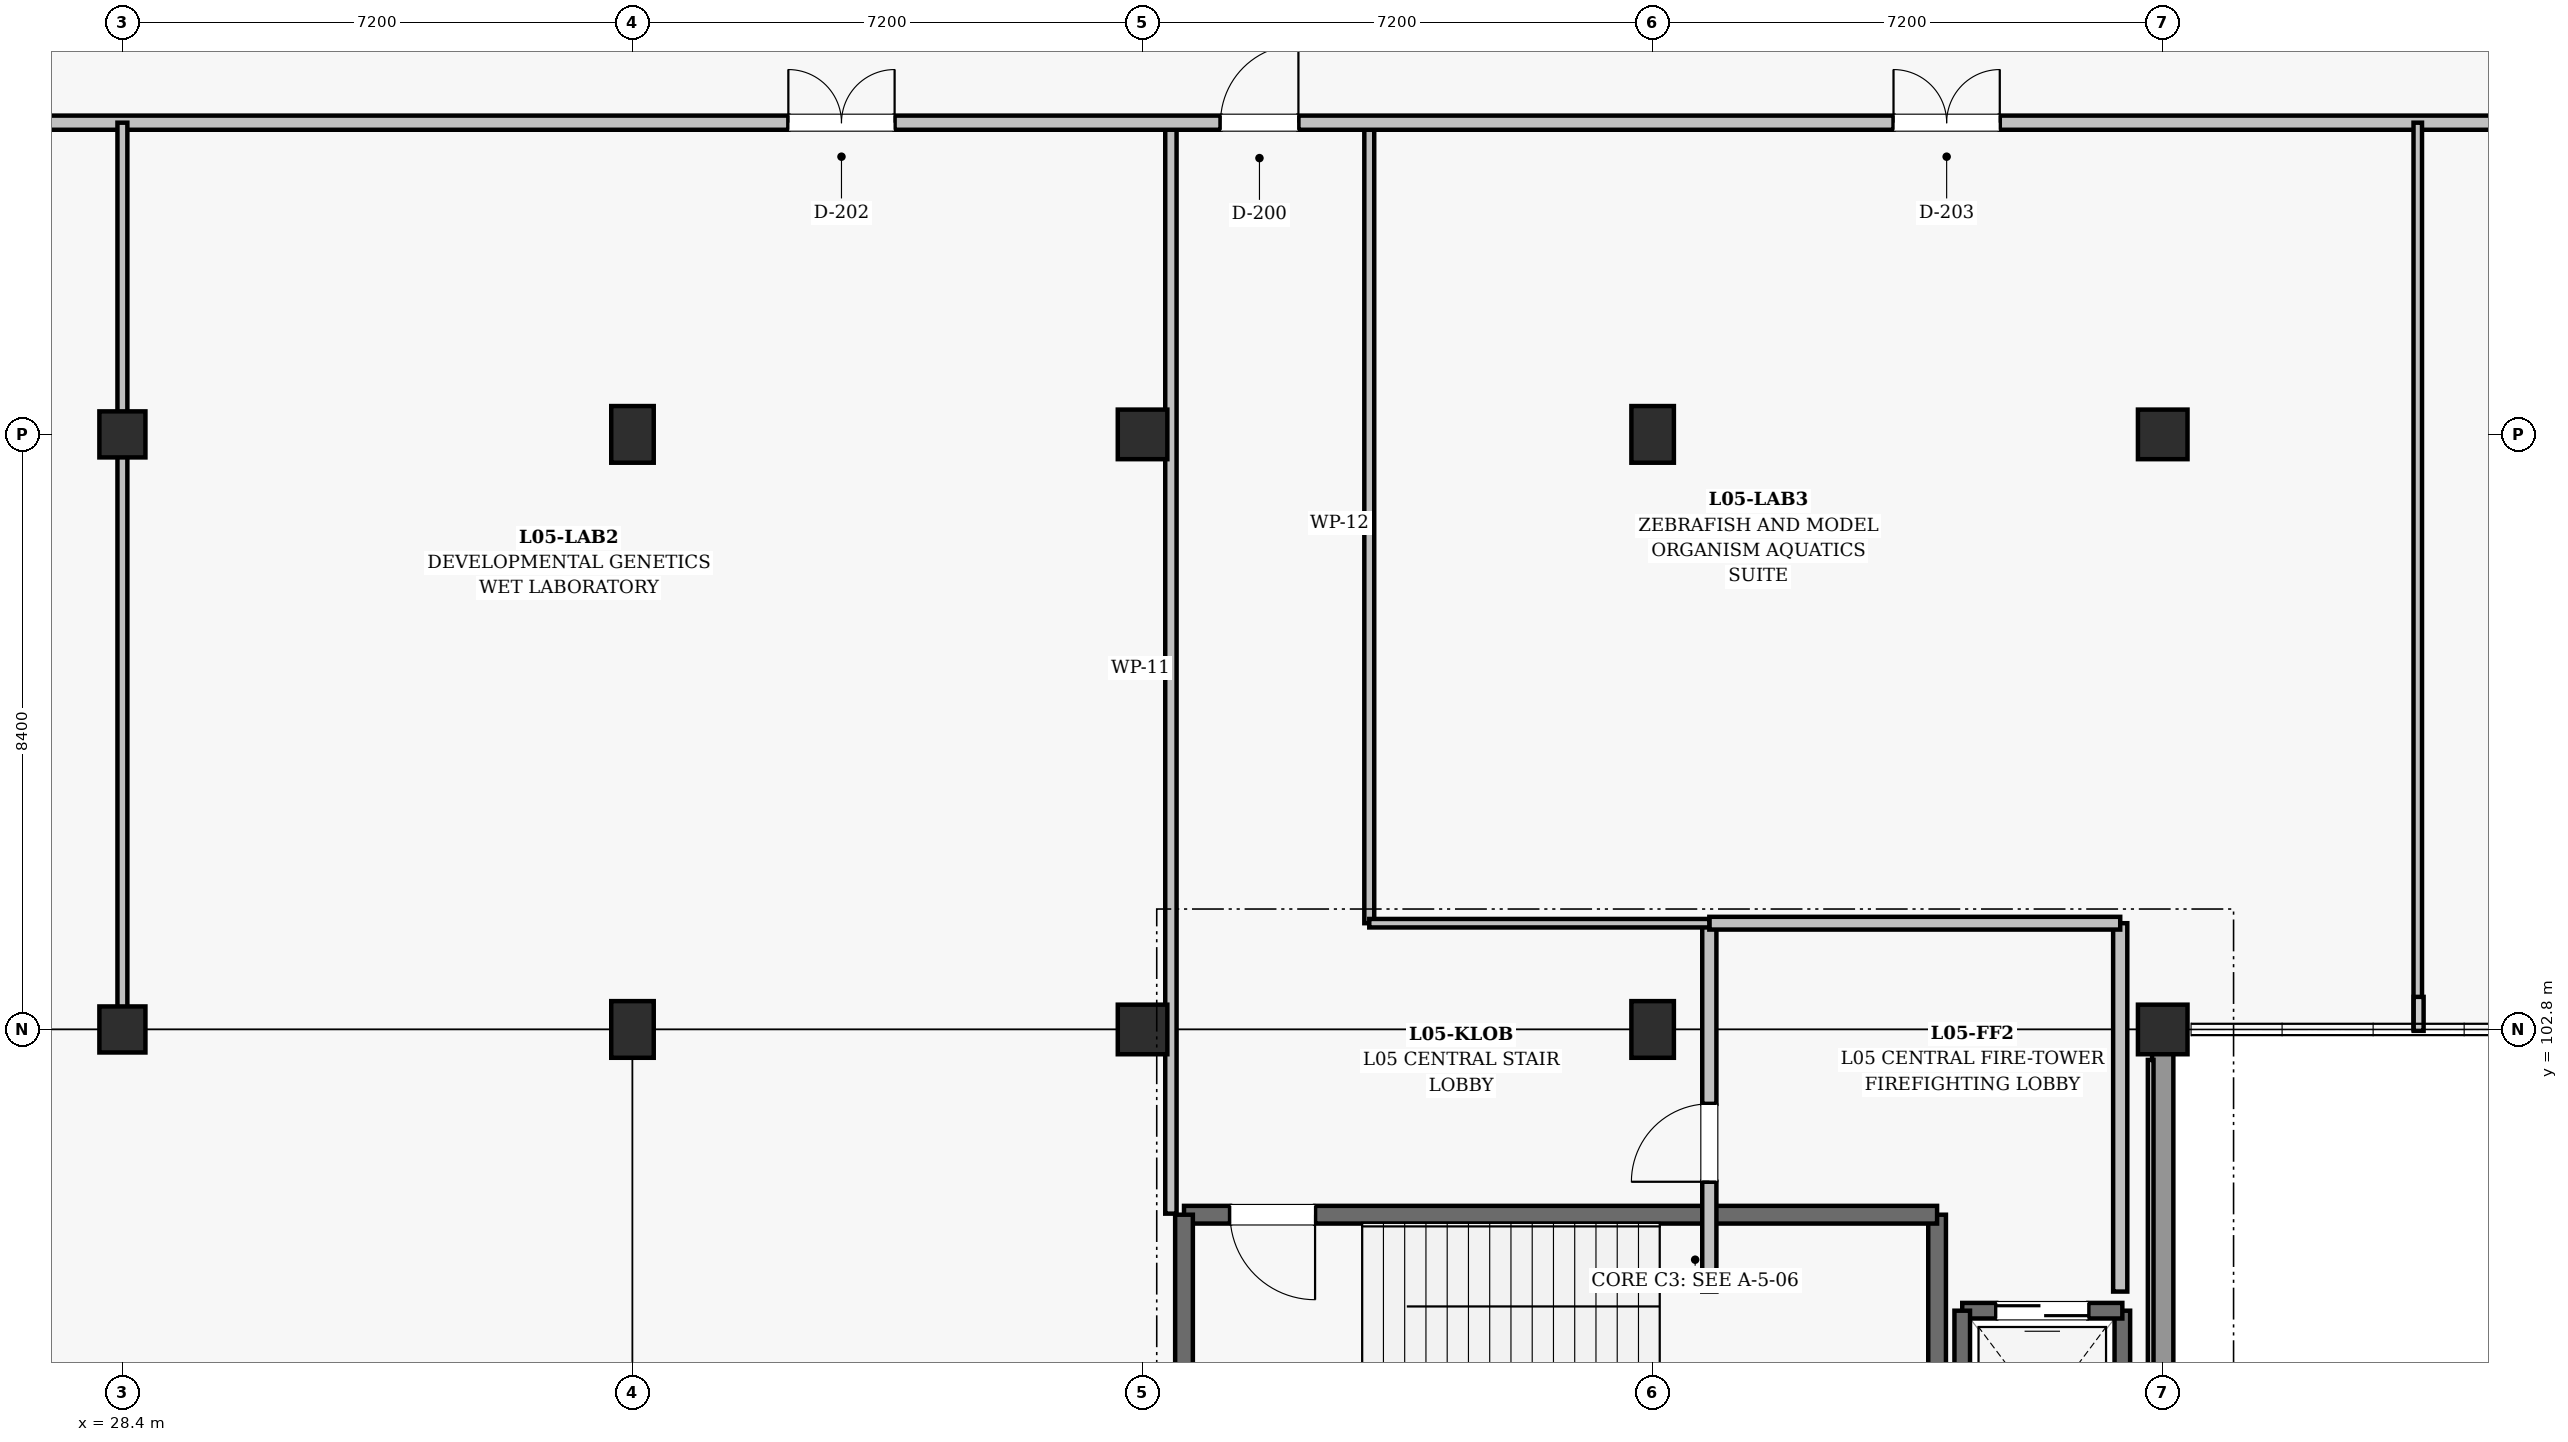
"""IFC4 building model, lengths in metres.
Left out: names, types, materials, properties, quantities, classifications, styles, units other than length and angle.
Written with IfcOpenShell. Run it as: python <this file> out.ifc"""

import sys

from ifc_helpers import new_model, si_unit, direction, frame, frame_2d, origin, origin_2d, place, context, subcontext, project, spatial, rectangle, extrude, element, fill, save


model = new_model("IFC4")
c1 = context("Model", 3, precision=1e-05, world=origin(), true_north=direction((0.0, 1.0)))
c2 = subcontext(c1, "Body", "Model", "MODEL_VIEW")
j1 = project(units=[si_unit("LENGTHUNIT", "METRE"), si_unit("PLANEANGLEUNIT", "RADIAN")], contexts=[c1])
p1 = place(None, origin())
s1 = spatial("IfcSite", under=j1, at=p1, CompositionType="ELEMENT")
p2 = place(p1, origin())
s2 = spatial("IfcBuilding", under=s1, at=p2, CompositionType="ELEMENT")
p3 = place(p2, frame((0.0, 0.0, 23.4)))
s3 = spatial("IfcBuildingStorey", under=s2, at=p3, CompositionType="ELEMENT", Elevation=23.4)
for number, where, z_axis, x_axis in (
    (1, (28.4, 102.8, 0.0), (0.0, 0.0, 1.0), (1.0, 0.0, 0.0)),
    (2, (28.4, 111.2, 0.0), (0.0, 0.0, 1.0), (1.0, 0.0, 0.0)),
):
    element("IfcColumn", number, at=place(p3, frame(where, z_axis=z_axis, x_axis=x_axis)), inside=s3, PredefinedType="COLUMN", context=c2, shape_type="SweptSolid", body=[
        extrude(rectangle(XDim=0.65, YDim=0.65, at=origin_2d()), origin(), (0.0, 0.0, 1.0), 4.5),
    ])
for number, where, z_axis, x_axis in (
    (3, (35.6, 102.8, 0.0), (0.0, 0.0, 1.0), (1.0, 0.0, 0.0)),
    (4, (35.6, 111.2, 0.0), (0.0, 0.0, 1.0), (1.0, 0.0, 0.0)),
):
    element("IfcColumn", number, at=place(p3, frame(where, z_axis=z_axis, x_axis=x_axis)), inside=s3, PredefinedType="COLUMN", context=c2, shape_type="SweptSolid", body=[
        extrude(rectangle(XDim=0.6, YDim=0.8, at=origin_2d()), origin(), (0.0, 0.0, 1.0), 4.5),
    ])
for number, where, z_axis, x_axis in (
    (5, (42.8, 102.8, 0.0), (0.0, 0.0, 1.0), (1.0, 0.0, 0.0)),
    (6, (42.8, 111.2, 0.0), (0.0, 0.0, 1.0), (1.0, 0.0, 0.0)),
):
    element("IfcColumn", number, at=place(p3, frame(where, z_axis=z_axis, x_axis=x_axis)), inside=s3, PredefinedType="COLUMN", context=c2, shape_type="SweptSolid", body=[
        extrude(rectangle(XDim=0.7, YDim=0.7, at=origin_2d()), origin(), (0.0, 0.0, 1.0), 4.5),
    ])
for number, where, z_axis, x_axis in (
    (7, (50.0, 102.8, 0.0), (0.0, 0.0, 1.0), (1.0, 0.0, 0.0)),
    (8, (50.0, 111.2, 0.0), (0.0, 0.0, 1.0), (1.0, 0.0, 0.0)),
):
    element("IfcColumn", number, at=place(p3, frame(where, z_axis=z_axis, x_axis=x_axis)), inside=s3, PredefinedType="COLUMN", context=c2, shape_type="SweptSolid", body=[
        extrude(rectangle(XDim=0.6, YDim=0.8, at=origin_2d()), origin(), (0.0, 0.0, 1.0), 4.5),
    ])
for number, where, z_axis, x_axis in (
    (9, (57.2, 102.8, 0.0), (0.0, 0.0, 1.0), (1.0, 0.0, 0.0)),
    (10, (57.2, 111.2, 0.0), (0.0, 0.0, 1.0), (1.0, 0.0, 0.0)),
):
    element("IfcColumn", number, at=place(p3, frame(where, z_axis=z_axis, x_axis=x_axis)), inside=s3, PredefinedType="COLUMN", context=c2, shape_type="SweptSolid", body=[
        extrude(rectangle(XDim=0.7, YDim=0.7, at=origin_2d()), origin(), (0.0, 0.0, 1.0), 4.5),
    ])
p4 = place(p3, frame((57.2, 94.705, 0.0), z_axis=(0.0, 0.0, 1.0), x_axis=(0.0, 1.0, 0.0)))
e11 = element("IfcWall", 11, at=p4, inside=s3, PredefinedType="SOLIDWALL", context=c2, shape_type="SweptSolid", body=[
    extrude(rectangle(XDim=7.765, YDim=0.3, at=frame_2d((3.882, 0.0))), origin(), (0.0, 0.0, 1.0), 3.355),
])
p5 = place(p3, frame((54.015, 95.085, 0.0), z_axis=(0.0, 0.0, 1.0), x_axis=(0.0, 1.0, 0.0)))
e12 = element("IfcWall", 12, at=p5, inside=s3, PredefinedType="SHEAR", context=c2, shape_type="SweptSolid", body=[
    extrude(rectangle(XDim=5.1, YDim=0.25, at=frame_2d((2.55, 0.0))), origin(), (0.0, 0.0, 1.0), 4.175),
])
p6 = place(p3, frame((54.015, 100.185, 0.0), z_axis=(0.0, 0.0, 1.0), x_axis=(-1.0, 0.0, 0.0)))
e13 = element("IfcWall", 13, at=p6, inside=s3, PredefinedType="SHEAR", context=c2, shape_type="SweptSolid", body=[
    extrude(rectangle(XDim=10.63, YDim=0.25, at=frame_2d((5.315, 0.0))), origin(), (0.0, 0.0, 1.0), 4.175),
])
p7 = place(p6, frame((8.78, 0.0, 0.0)))
e14 = element("IfcOpeningElement", 14, at=p7, cuts=e13, PredefinedType="OPENING", context=c2, shape_type="SweptSolid", body=[
    extrude(rectangle(XDim=1.2, YDim=2.15, at=frame_2d((0.6, 1.075))), frame((0.0, 0.135, 0.0), z_axis=(0.0, -1.0, 0.0), x_axis=(1.0, 0.0, 0.0)), (0.0, 0.0, 1.0), 0.27),
])
p8 = place(p3, frame((43.385, 100.185, 0.0), z_axis=(0.0, 0.0, 1.0), x_axis=(0.0, -1.0, 0.0)))
e15 = element("IfcWall", 15, at=p8, inside=s3, PredefinedType="SHEAR", context=c2, shape_type="SweptSolid", body=[
    extrude(rectangle(XDim=5.1, YDim=0.25, at=frame_2d((2.55, 0.0))), origin(), (0.0, 0.0, 1.0), 4.175),
])
p9 = place(p3, frame((56.63, 95.97, 0.0), z_axis=(0.0, 0.0, 1.0), x_axis=(0.0, 1.0, 0.0)))
e16 = element("IfcWall", 16, at=p9, inside=s3, PredefinedType="SHEAR", context=c2, shape_type="SweptSolid", body=[
    extrude(rectangle(XDim=2.86, YDim=0.22, at=frame_2d((1.43, 0.0))), origin(), (0.0, 0.0, 1.0), 4.175),
])
p10 = place(p3, frame((56.63, 98.83, 0.0), z_axis=(0.0, 0.0, 1.0), x_axis=(-1.0, 0.0, 0.0)))
e17 = element("IfcWall", 17, at=p10, inside=s3, PredefinedType="SHEAR", context=c2, shape_type="SweptSolid", body=[
    extrude(rectangle(XDim=2.26, YDim=0.22, at=frame_2d((1.13, 0.0))), origin(), (0.0, 0.0, 1.0), 4.175),
])
p11 = place(p10, frame((0.48, 0.0, 0.0)))
e18 = element("IfcOpeningElement", 18, at=p11, cuts=e17, PredefinedType="OPENING", context=c2, shape_type="SweptSolid", body=[
    extrude(rectangle(XDim=1.3, YDim=2.2, at=frame_2d((0.65, 1.1))), frame((0.0, 0.12, 0.0), z_axis=(0.0, -1.0, 0.0), x_axis=(1.0, 0.0, 0.0)), (0.0, 0.0, 1.0), 0.24),
])
p12 = place(p3, frame((54.37, 98.83, 0.0), z_axis=(0.0, 0.0, 1.0), x_axis=(0.0, -1.0, 0.0)))
e19 = element("IfcWall", 19, at=p12, inside=s3, PredefinedType="SHEAR", context=c2, shape_type="SweptSolid", body=[
    extrude(rectangle(XDim=2.86, YDim=0.22, at=frame_2d((1.43, 0.0))), origin(), (0.0, 0.0, 1.0), 4.175),
])
p13 = place(p3, frame((50.8, 99.1, 0.0), z_axis=(0.0, 0.0, 1.0), x_axis=(0.0, 1.0, 0.0)))
e20 = element("IfcWall", 20, at=p13, inside=s3, PredefinedType="SOLIDWALL", context=c2, shape_type="SweptSolid", body=[
    extrude(rectangle(XDim=5.2, YDim=0.2, at=frame_2d((2.6, 0.0))), origin(), (0.0, 0.0, 1.0), 3.36),
])
p14 = place(p13, frame((1.55, 0.0, 0.0)))
e21 = element("IfcOpeningElement", 21, at=p14, cuts=e20, PredefinedType="OPENING", context=c2, shape_type="SweptSolid", body=[
    extrude(rectangle(XDim=1.1, YDim=2.15, at=frame_2d((0.55, 1.075))), frame((0.0, 0.11, 0.0), z_axis=(0.0, -1.0, 0.0), x_axis=(1.0, 0.0, 0.0)), (0.0, 0.0, 1.0), 0.22),
])
p15 = place(p3, frame((56.6, 99.1, 0.0), z_axis=(0.0, 0.0, 1.0), x_axis=(0.0, 1.0, 0.0)))
e22 = element("IfcWall", 22, at=p15, inside=s3, PredefinedType="SOLIDWALL", context=c2, shape_type="SweptSolid", body=[
    extrude(rectangle(XDim=5.2, YDim=0.2, at=frame_2d((2.6, 0.0))), origin(), (0.0, 0.0, 1.0), 3.36),
])
p16 = place(p3, frame((50.8, 104.3, 0.0), z_axis=(0.0, 0.0, 1.0), x_axis=(1.0, 0.0, 0.0)))
e23 = element("IfcWall", 23, at=p16, inside=s3, PredefinedType="SOLIDWALL", context=c2, shape_type="SweptSolid", body=[
    extrude(rectangle(XDim=5.8, YDim=0.18, at=frame_2d((2.9, 0.0))), origin(), (0.0, 0.0, 1.0), 3.56),
])
p17 = place(p3, frame((43.2, 100.2, 0.0), z_axis=(0.0, 0.0, 1.0), x_axis=(0.0, 1.0, 0.0)))
e24 = element("IfcWall", 24, at=p17, inside=s3, PredefinedType="PARTITIONING", context=c2, shape_type="SweptSolid", body=[
    extrude(rectangle(XDim=15.4, YDim=0.16, at=frame_2d((7.7, 0.0))), origin(), (0.0, 0.0, 1.0), 2.96),
])
p18 = place(p3, frame((46.0, 104.3, 0.0), z_axis=(0.0, 0.0, 1.0), x_axis=(0.0, 1.0, 0.0)))
e25 = element("IfcWall", 25, at=p18, inside=s3, PredefinedType="PARTITIONING", context=c2, shape_type="SweptSolid", body=[
    extrude(rectangle(XDim=11.3, YDim=0.14, at=frame_2d((5.65, 0.0))), origin(), (0.0, 0.0, 1.0), 3.52),
])
p19 = place(p3, frame((46.0, 104.3, 0.0), z_axis=(0.0, 0.0, 1.0), x_axis=(1.0, 0.0, 0.0)))
e26 = element("IfcWall", 26, at=p19, inside=s3, PredefinedType="PARTITIONING", context=c2, shape_type="SweptSolid", body=[
    extrude(rectangle(XDim=4.8, YDim=0.12, at=frame_2d((2.4, 0.0))), origin(), (0.0, 0.0, 1.0), 3.31),
])
p20 = place(p3, frame((14.0, 115.6, 0.0), z_axis=(0.0, 0.0, 1.0), x_axis=(1.0, 0.0, 0.0)))
e27 = element("IfcWall", 27, at=p20, inside=s3, PredefinedType="SOLIDWALL", context=c2, shape_type="SweptSolid", body=[
    extrude(rectangle(XDim=100.8, YDim=0.2, at=frame_2d((50.4, 0.0))), origin(), (0.0, 0.0, 1.0), 2.96),
])
p21 = place(p20, frame((29.9, 0.0, 0.0)))
e28 = element("IfcOpeningElement", 28, at=p21, cuts=e27, PredefinedType="OPENING", context=c2, shape_type="SweptSolid", body=[
    extrude(rectangle(XDim=1.1, YDim=2.15, at=frame_2d((0.55, 1.075))), frame((0.0, 0.11, 0.0), z_axis=(0.0, -1.0, 0.0), x_axis=(1.0, 0.0, 0.0)), (0.0, 0.0, 1.0), 0.22),
])
p22 = place(p20, frame((7.4, 0.0, 0.0)))
e29 = element("IfcOpeningElement", 29, at=p22, cuts=e27, PredefinedType="OPENING", context=c2, shape_type="SweptSolid", body=[
    extrude(rectangle(XDim=1.5, YDim=2.2, at=frame_2d((0.75, 1.1))), frame((0.0, 0.11, 0.0), z_axis=(0.0, -1.0, 0.0), x_axis=(1.0, 0.0, 0.0)), (0.0, 0.0, 1.0), 0.22),
])
p23 = place(p20, frame((23.8, 0.0, 0.0)))
e30 = element("IfcOpeningElement", 30, at=p23, cuts=e27, PredefinedType="OPENING", context=c2, shape_type="SweptSolid", body=[
    extrude(rectangle(XDim=1.5, YDim=2.2, at=frame_2d((0.75, 1.1))), frame((0.0, 0.11, 0.0), z_axis=(0.0, -1.0, 0.0), x_axis=(1.0, 0.0, 0.0)), (0.0, 0.0, 1.0), 0.22),
])
p24 = place(p20, frame((39.4, 0.0, 0.0)))
e31 = element("IfcOpeningElement", 31, at=p24, cuts=e27, PredefinedType="OPENING", context=c2, shape_type="SweptSolid", body=[
    extrude(rectangle(XDim=1.5, YDim=2.2, at=frame_2d((0.75, 1.1))), frame((0.0, 0.11, 0.0), z_axis=(0.0, -1.0, 0.0), x_axis=(1.0, 0.0, 0.0)), (0.0, 0.0, 1.0), 0.22),
])
p25 = place(p20, frame((54.9, 0.0, 0.0)))
e32 = element("IfcOpeningElement", 32, at=p25, cuts=e27, PredefinedType="OPENING", context=c2, shape_type="SweptSolid", body=[
    extrude(rectangle(XDim=1.5, YDim=2.2, at=frame_2d((0.75, 1.1))), frame((0.0, 0.11, 0.0), z_axis=(0.0, -1.0, 0.0), x_axis=(1.0, 0.0, 0.0)), (0.0, 0.0, 1.0), 0.22),
])
p26 = place(p20, frame((74.9, 0.0, 0.0)))
e33 = element("IfcOpeningElement", 33, at=p26, cuts=e27, PredefinedType="OPENING", context=c2, shape_type="SweptSolid", body=[
    extrude(rectangle(XDim=1.5, YDim=2.2, at=frame_2d((0.75, 1.1))), frame((0.0, 0.11, 0.0), z_axis=(0.0, -1.0, 0.0), x_axis=(1.0, 0.0, 0.0)), (0.0, 0.0, 1.0), 0.22),
])
p27 = place(p20, frame((91.6, 0.0, 0.0)))
e34 = element("IfcOpeningElement", 34, at=p27, cuts=e27, PredefinedType="OPENING", context=c2, shape_type="SweptSolid", body=[
    extrude(rectangle(XDim=1.5, YDim=2.2, at=frame_2d((0.75, 1.1))), frame((0.0, 0.11, 0.0), z_axis=(0.0, -1.0, 0.0), x_axis=(1.0, 0.0, 0.0)), (0.0, 0.0, 1.0), 0.22),
])
p28 = place(p3, frame((28.4, 102.8, 0.0), z_axis=(0.0, 0.0, 1.0), x_axis=(0.0, 1.0, 0.0)))
e35 = element("IfcWall", 35, at=p28, inside=s3, PredefinedType="PARTITIONING", context=c2, shape_type="SweptSolid", body=[
    extrude(rectangle(XDim=12.8, YDim=0.14, at=frame_2d((6.4, 0.0))), origin(), (0.0, 0.0, 1.0), 3.36),
])
p29 = place(p3, frame((60.8, 102.8, 0.0), z_axis=(0.0, 0.0, 1.0), x_axis=(0.0, 1.0, 0.0)))
e36 = element("IfcWall", 36, at=p29, inside=s3, PredefinedType="PARTITIONING", context=c2, shape_type="SweptSolid", body=[
    extrude(rectangle(XDim=12.8, YDim=0.12, at=frame_2d((6.4, 0.0))), origin(), (0.0, 0.0, 1.0), 3.51),
])
p30 = place(p7, origin())
e37 = element("IfcDoor", 37, at=p30, inside=s3, OperationType="SINGLE_SWING_LEFT", PredefinedType="DOOR", context=c2, shape_type="SweptSolid", body=[
    extrude(rectangle(XDim=1.2, YDim=2.15, at=frame_2d((0.6, 1.075))), frame((0.0, 0.025, 0.0), z_axis=(0.0, -1.0, 0.0), x_axis=(1.0, 0.0, 0.0)), (0.0, 0.0, 1.0), 0.05),
])
fill(e14, e37)
p31 = place(p11, origin())
e38 = element("IfcDoor", 38, at=p31, inside=s3, OperationType="DOUBLE_DOOR_SLIDING", PredefinedType="DOOR", context=c2, shape_type="SweptSolid", body=[
    extrude(rectangle(XDim=1.3, YDim=2.2, at=frame_2d((0.65, 1.1))), frame((0.0, 0.025, 0.0), z_axis=(0.0, -1.0, 0.0), x_axis=(1.0, 0.0, 0.0)), (0.0, 0.0, 1.0), 0.05),
])
fill(e18, e38)
p32 = place(p14, origin())
e39 = element("IfcDoor", 39, at=p32, inside=s3, OperationType="SINGLE_SWING_LEFT", PredefinedType="DOOR", context=c2, shape_type="SweptSolid", body=[
    extrude(rectangle(XDim=1.1, YDim=2.15, at=frame_2d((0.55, 1.075))), frame((0.0, 0.025, 0.0), z_axis=(0.0, -1.0, 0.0), x_axis=(1.0, 0.0, 0.0)), (0.0, 0.0, 1.0), 0.05),
])
fill(e21, e39)
p33 = place(p21, origin())
e40 = element("IfcDoor", 40, at=p33, inside=s3, OperationType="SINGLE_SWING_RIGHT", PredefinedType="DOOR", context=c2, shape_type="SweptSolid", body=[
    extrude(rectangle(XDim=1.1, YDim=2.15, at=frame_2d((0.55, 1.075))), frame((0.0, 0.025, 0.0), z_axis=(0.0, -1.0, 0.0), x_axis=(1.0, 0.0, 0.0)), (0.0, 0.0, 1.0), 0.05),
])
fill(e28, e40)
p34 = place(p23, origin())
e41 = element("IfcDoor", 41, at=p34, inside=s3, OperationType="DOUBLE_DOOR_SINGLE_SWING", PredefinedType="DOOR", context=c2, shape_type="SweptSolid", body=[
    extrude(rectangle(XDim=1.5, YDim=2.2, at=frame_2d((0.75, 1.1))), frame((0.0, 0.025, 0.0), z_axis=(0.0, -1.0, 0.0), x_axis=(1.0, 0.0, 0.0)), (0.0, 0.0, 1.0), 0.05),
])
fill(e30, e41)
p35 = place(p24, origin())
e42 = element("IfcDoor", 42, at=p35, inside=s3, OperationType="DOUBLE_DOOR_SINGLE_SWING", PredefinedType="DOOR", context=c2, shape_type="SweptSolid", body=[
    extrude(rectangle(XDim=1.5, YDim=2.2, at=frame_2d((0.75, 1.1))), frame((0.0, 0.025, 0.0), z_axis=(0.0, -1.0, 0.0), x_axis=(1.0, 0.0, 0.0)), (0.0, 0.0, 1.0), 0.05),
])
fill(e31, e42)
save(model, sys.argv[1])
